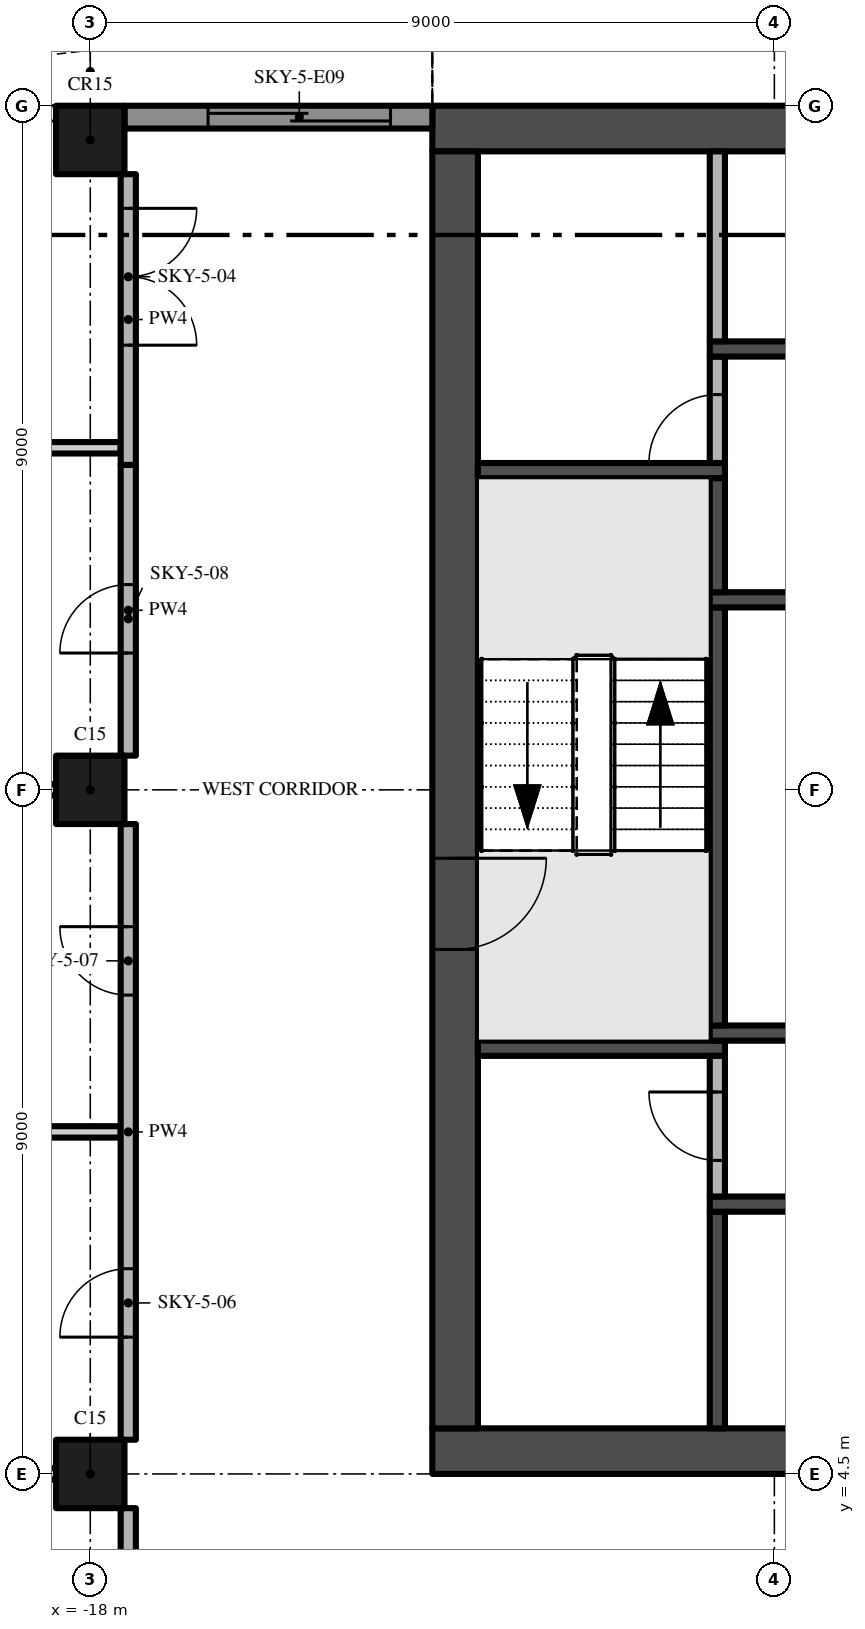
"""IFC4 building model, lengths in metres.
Left out: names, types, materials, properties, quantities, classifications, styles, units other than length and angle.
Written with IfcOpenShell. Run it as: python <this file> out.ifc"""

import sys

from ifc_helpers import new_model, si_unit, direction, frame, frame_2d, origin, origin_2d, place, context, subcontext, project, spatial, polyline, rectangle, outline, extrude, element, fill, save


model = new_model("IFC4")
c1 = context("Model", 3, precision=1e-05, world=origin(), true_north=direction((0.0, 1.0)))
c2 = subcontext(c1, "Body", "Model", "MODEL_VIEW")
j1 = project(units=[si_unit("LENGTHUNIT", "METRE"), si_unit("PLANEANGLEUNIT", "RADIAN")], contexts=[c1])
p1 = place(None, origin())
s1 = spatial("IfcSite", under=j1, at=p1, CompositionType="ELEMENT")
p2 = place(p1, origin())
s2 = spatial("IfcBuilding", under=s1, at=p2, CompositionType="ELEMENT")
p3 = place(p2, frame((0.0, 0.0, 284.4)))
s3 = spatial("IfcBuildingStorey", under=s2, at=p3, CompositionType="ELEMENT", Elevation=284.4)
p4 = place(p3, frame((-13.5, 4.8, -0.3), z_axis=(0.0, 0.0, 1.0), x_axis=(1.0, 0.0, 0.0)))
e1 = element("IfcWall", 1, at=p4, inside=s3, PredefinedType="SHEAR", context=c2, shape_type="SweptSolid", body=[
    extrude(rectangle(XDim=27.0, YDim=0.6, at=frame_2d((13.5, 0.0))), origin(), (0.0, 0.0, 1.0), 5.0),
])
p5 = place(p4, frame((12.0, 0.0, 0.3)))
e2 = element("IfcOpeningElement", 2, at=p5, cuts=e1, PredefinedType="OPENING", context=c2, shape_type="SweptSolid", body=[
    extrude(rectangle(XDim=3.0, YDim=2.4, at=frame_2d((1.5, 1.2))), frame((0.0, 0.31, 0.0), z_axis=(0.0, -1.0, 0.0), x_axis=(1.0, 0.0, 0.0)), (0.0, 0.0, 1.0), 0.62),
])
p6 = place(p4, frame((4.9, 0.0, 0.3)))
e3 = element("IfcOpeningElement", 3, at=p6, cuts=e1, PredefinedType="OPENING", context=c2, shape_type="SweptSolid", body=[
    extrude(rectangle(XDim=1.2, YDim=2.2, at=frame_2d((0.6, 1.1))), frame((0.0, 0.31, 0.0), z_axis=(0.0, -1.0, 0.0), x_axis=(1.0, 0.0, 0.0)), (0.0, 0.0, 1.0), 0.62),
])
p7 = place(p4, frame((20.75, 0.0, 0.3)))
e4 = element("IfcOpeningElement", 4, at=p7, cuts=e1, PredefinedType="OPENING", context=c2, shape_type="SweptSolid", body=[
    extrude(rectangle(XDim=1.5, YDim=2.2, at=frame_2d((0.75, 1.1))), frame((0.0, 0.31, 0.0), z_axis=(0.0, -1.0, 0.0), x_axis=(1.0, 0.0, 0.0)), (0.0, 0.0, 1.0), 0.62),
])
p8 = place(p4, frame((17.4, 0.0, 0.3)))
e5 = element("IfcOpeningElement", 5, at=p8, cuts=e1, PredefinedType="OPENING", context=c2, shape_type="SweptSolid", body=[
    extrude(rectangle(XDim=1.2, YDim=2.2, at=frame_2d((0.6, 1.1))), frame((0.0, 0.31, 0.0), z_axis=(0.0, -1.0, 0.0), x_axis=(1.0, 0.0, 0.0)), (0.0, 0.0, 1.0), 0.62),
])
p9 = place(p3, frame((13.5, 22.2, -0.3), z_axis=(0.0, 0.0, 1.0), x_axis=(-1.0, 0.0, 0.0)))
e6 = element("IfcWall", 6, at=p9, inside=s3, PredefinedType="SHEAR", context=c2, shape_type="SweptSolid", body=[
    extrude(rectangle(XDim=27.0, YDim=0.6, at=frame_2d((13.5, 0.0))), origin(), (0.0, 0.0, 1.0), 5.0),
])
p10 = place(p3, frame((-13.2, 21.9, -0.3), z_axis=(0.0, 0.0, 1.0), x_axis=(0.0, -1.0, 0.0)))
e7 = element("IfcWall", 7, at=p10, inside=s3, PredefinedType="SHEAR", context=c2, shape_type="SweptSolid", body=[
    extrude(rectangle(XDim=16.8, YDim=0.6, at=frame_2d((8.4, 0.0))), origin(), (0.0, 0.0, 1.0), 5.0),
])
p11 = place(p10, frame((9.3, 0.0, 0.3)))
e8 = element("IfcOpeningElement", 8, at=p11, cuts=e7, PredefinedType="OPENING", context=c2, shape_type="SweptSolid", body=[
    extrude(rectangle(XDim=1.2, YDim=2.2, at=frame_2d((0.6, 1.1))), frame((0.0, 0.31, 0.0), z_axis=(0.0, -1.0, 0.0), x_axis=(1.0, 0.0, 0.0)), (0.0, 0.0, 1.0), 0.62),
])
for number, where, z_axis, x_axis in (
    (9, (-18.0, 13.5, 0.0), (0.0, 0.0, 1.0), (1.0, 0.0, 0.0)),
    (10, (-18.0, 22.05, 0.0), (0.0, 0.0, 1.0), (1.0, 0.0, 0.0)),
    (11, (-18.0, 4.5, 0.0), (0.0, 0.0, 1.0), (1.0, 0.0, 0.0)),
):
    element("IfcColumn", number, at=place(p3, frame(where, z_axis=z_axis, x_axis=x_axis)), inside=s3, PredefinedType="COLUMN", context=c2, shape_type="SweptSolid", body=[
        extrude(rectangle(XDim=0.9, YDim=0.9, at=origin_2d()), origin(), (0.0, 0.0, 1.0), 4.7),
    ])
p12 = place(p3, frame((-17.55, 22.35, 0.0), z_axis=(0.0, 0.0, 1.0), x_axis=(1.0, 0.0, 0.0)))
e12 = element("IfcWall", 12, at=p12, inside=s3, PredefinedType="SOLIDWALL", context=c2, shape_type="SweptSolid", body=[
    extrude(rectangle(XDim=4.05, YDim=0.3, at=frame_2d((2.025, 0.0))), origin(), (0.0, 0.0, 1.0), 4.7),
])
p13 = place(p12, frame((1.1, 0.0, 0.0)))
e13 = element("IfcOpeningElement", 13, at=p13, cuts=e12, PredefinedType="OPENING", context=c2, shape_type="SweptSolid", body=[
    extrude(rectangle(XDim=2.4, YDim=2.4, at=frame_2d((1.2, 1.2))), frame((0.0, 0.16, 0.0), z_axis=(0.0, -1.0, 0.0), x_axis=(1.0, 0.0, 0.0)), (0.0, 0.0, 1.0), 0.32),
])
p14 = place(p3, origin())
e14 = element("IfcWall", 14, at=p14, inside=s3, PredefinedType="USERDEFINED", context=c2, shape_type="SweptSolid", body=[
    extrude(outline(polyline([(-13.5, 25.149), (-15.0, 24.488), (-16.5, 23.755), (-18.0, 23.231), (-19.125, 23.1), (-19.5, 23.115), (-21.0, 23.451), (-22.5, 24.112), (-22.601, 23.883), (-21.079, 23.213), (-19.533, 22.866), (-19.115, 22.849), (-17.944, 22.986), (-16.404, 23.524), (-14.895, 24.261), (-13.399, 24.92), (-13.5, 25.149)])), origin(), (0.0, 0.0, 1.0), 0.9),
])
for number, where, z_axis, x_axis in (
    (15, (-12.9, 10.1, 0.0), (0.0, 0.0, 1.0), (1.0, 0.0, 0.0)),
    (16, (-12.9, 17.7, 0.0), (0.0, 0.0, 1.0), (1.0, 0.0, 0.0)),
):
    element("IfcWall", number, at=place(p3, frame(where, z_axis=z_axis, x_axis=x_axis)), inside=s3, PredefinedType="SHEAR", context=c2, shape_type="SweptSolid", body=[
        extrude(rectangle(XDim=3.25, YDim=0.2, at=frame_2d((1.625, 0.0))), origin(), (0.0, 0.0, 1.0), 4.7),
    ])
p15 = place(p3, frame((-9.75, 5.1, 0.0), z_axis=(0.0, 0.0, 1.0), x_axis=(0.0, 1.0, 0.0)))
e17 = element("IfcWall", 17, at=p15, inside=s3, PredefinedType="SHEAR", context=c2, shape_type="SweptSolid", body=[
    extrude(rectangle(XDim=2.85, YDim=0.2, at=frame_2d((1.425, 0.0))), origin(), (0.0, 0.0, 1.0), 4.7),
])
p16 = place(p3, frame((-9.85, 8.05, 0.0), z_axis=(0.0, 0.0, 1.0), x_axis=(1.0, 0.0, 0.0)))
e18 = element("IfcWall", 18, at=p16, inside=s3, PredefinedType="SHEAR", context=c2, shape_type="SweptSolid", body=[
    extrude(rectangle(XDim=8.35, YDim=0.2, at=frame_2d((4.175, 0.0))), origin(), (0.0, 0.0, 1.0), 4.7),
])
p17 = place(p3, frame((-9.75, 8.15, 0.0), z_axis=(0.0, 0.0, 1.0), x_axis=(0.0, 1.0, 0.0)))
e19 = element("IfcWall", 19, at=p17, inside=s3, PredefinedType="PARTITIONING", context=c2, shape_type="SweptSolid", body=[
    extrude(rectangle(XDim=1.85, YDim=0.2, at=frame_2d((0.925, 0.0))), origin(), (0.0, 0.0, 1.0), 4.7),
])
p18 = place(p17, frame((0.475, 0.0, 0.0)))
e20 = element("IfcOpeningElement", 20, at=p18, cuts=e19, PredefinedType="OPENING", context=c2, shape_type="SweptSolid", body=[
    extrude(rectangle(XDim=0.9, YDim=2.1, at=frame_2d((0.45, 1.05))), frame((0.0, 0.11, 0.0), z_axis=(0.0, -1.0, 0.0), x_axis=(1.0, 0.0, 0.0)), (0.0, 0.0, 1.0), 0.22),
])
p19 = place(p3, frame((-9.85, 10.3, 0.0), z_axis=(0.0, 0.0, 1.0), x_axis=(1.0, 0.0, 0.0)))
e21 = element("IfcWall", 21, at=p19, inside=s3, PredefinedType="SHEAR", context=c2, shape_type="SweptSolid", body=[
    extrude(rectangle(XDim=8.35, YDim=0.2, at=frame_2d((4.175, 0.0))), origin(), (0.0, 0.0, 1.0), 4.7),
])
p20 = place(p3, frame((-9.75, 10.4, 0.0), z_axis=(0.0, 0.0, 1.0), x_axis=(0.0, 1.0, 0.0)))
e22 = element("IfcWall", 22, at=p20, inside=s3, PredefinedType="SHEAR", context=c2, shape_type="SweptSolid", body=[
    extrude(rectangle(XDim=5.5, YDim=0.2, at=frame_2d((2.75, 0.0))), origin(), (0.0, 0.0, 1.0), 4.7),
])
p21 = place(p3, frame((-1.5, 16.0, 0.0), z_axis=(0.0, 0.0, 1.0), x_axis=(-1.0, 0.0, 0.0)))
e23 = element("IfcWall", 23, at=p21, inside=s3, PredefinedType="SHEAR", context=c2, shape_type="SweptSolid", body=[
    extrude(rectangle(XDim=8.35, YDim=0.2, at=frame_2d((4.175, 0.0))), origin(), (0.0, 0.0, 1.0), 4.7),
])
p22 = place(p21, frame((6.162, 0.0, 0.0)))
e24 = element("IfcOpeningElement", 24, at=p22, cuts=e23, PredefinedType="OPENING", context=c2, shape_type="SweptSolid", body=[
    extrude(rectangle(XDim=0.9, YDim=2.1, at=frame_2d((0.45, 1.05))), frame((0.0, 0.11, 0.0), z_axis=(0.0, -1.0, 0.0), x_axis=(1.0, 0.0, 0.0)), (0.0, 0.0, 1.0), 0.22),
])
p23 = place(p3, frame((-9.75, 16.1, 0.0), z_axis=(0.0, 0.0, 1.0), x_axis=(0.0, 1.0, 0.0)))
e25 = element("IfcWall", 25, at=p23, inside=s3, PredefinedType="SHEAR", context=c2, shape_type="SweptSolid", body=[
    extrude(rectangle(XDim=1.5, YDim=0.2, at=frame_2d((0.75, 0.0))), origin(), (0.0, 0.0, 1.0), 4.7),
])
p24 = place(p3, frame((-9.75, 17.8, 0.0), z_axis=(0.0, 0.0, 1.0), x_axis=(0.0, 1.0, 0.0)))
e26 = element("IfcWall", 26, at=p24, inside=s3, PredefinedType="PARTITIONING", context=c2, shape_type="SweptSolid", body=[
    extrude(rectangle(XDim=1.4, YDim=0.2, at=frame_2d((0.7, 0.0))), origin(), (0.0, 0.0, 1.0), 4.7),
])
p25 = place(p24, origin())
e27 = element("IfcOpeningElement", 27, at=p25, cuts=e26, PredefinedType="OPENING", context=c2, shape_type="SweptSolid", body=[
    extrude(rectangle(XDim=0.9, YDim=2.1, at=frame_2d((0.45, 1.05))), frame((0.0, 0.11, 0.0), z_axis=(0.0, -1.0, 0.0), x_axis=(1.0, 0.0, 0.0)), (0.0, 0.0, 1.0), 0.22),
])
p26 = place(p3, frame((-9.85, 19.3, 0.0), z_axis=(0.0, 0.0, 1.0), x_axis=(1.0, 0.0, 0.0)))
e28 = element("IfcWall", 28, at=p26, inside=s3, PredefinedType="SHEAR", context=c2, shape_type="SweptSolid", body=[
    extrude(rectangle(XDim=19.7, YDim=0.2, at=frame_2d((9.85, 0.0))), origin(), (0.0, 0.0, 1.0), 4.7),
])
p27 = place(p26, frame((10.519, 0.0, 0.0)))
e29 = element("IfcOpeningElement", 29, at=p27, cuts=e28, PredefinedType="OPENING", context=c2, shape_type="SweptSolid", body=[
    extrude(rectangle(XDim=1.1, YDim=2.1, at=frame_2d((0.55, 1.05))), frame((0.0, 0.11, 0.0), z_axis=(0.0, -1.0, 0.0), x_axis=(1.0, 0.0, 0.0)), (0.0, 0.0, 1.0), 0.22),
])
p28 = place(p26, frame((12.956, 0.0, 0.0)))
e30 = element("IfcOpeningElement", 30, at=p28, cuts=e28, PredefinedType="OPENING", context=c2, shape_type="SweptSolid", body=[
    extrude(rectangle(XDim=1.1, YDim=2.1, at=frame_2d((0.55, 1.05))), frame((0.0, 0.11, 0.0), z_axis=(0.0, -1.0, 0.0), x_axis=(1.0, 0.0, 0.0)), (0.0, 0.0, 1.0), 0.22),
])
p29 = place(p26, frame((15.394, 0.0, 0.0)))
e31 = element("IfcOpeningElement", 31, at=p29, cuts=e28, PredefinedType="OPENING", context=c2, shape_type="SweptSolid", body=[
    extrude(rectangle(XDim=1.1, YDim=2.1, at=frame_2d((0.55, 1.05))), frame((0.0, 0.11, 0.0), z_axis=(0.0, -1.0, 0.0), x_axis=(1.0, 0.0, 0.0)), (0.0, 0.0, 1.0), 0.22),
])
p30 = place(p26, frame((17.831, 0.0, 0.0)))
e32 = element("IfcOpeningElement", 32, at=p30, cuts=e28, PredefinedType="OPENING", context=c2, shape_type="SweptSolid", body=[
    extrude(rectangle(XDim=1.1, YDim=2.1, at=frame_2d((0.55, 1.05))), frame((0.0, 0.11, 0.0), z_axis=(0.0, -1.0, 0.0), x_axis=(1.0, 0.0, 0.0)), (0.0, 0.0, 1.0), 0.22),
])
p31 = place(p26, frame((3.306, 0.0, 0.0)))
e33 = element("IfcOpeningElement", 33, at=p31, cuts=e28, PredefinedType="OPENING", context=c2, shape_type="SweptSolid", body=[
    extrude(rectangle(XDim=0.9, YDim=2.1, at=frame_2d((0.45, 1.05))), frame((0.0, 0.11, 0.0), z_axis=(0.0, -1.0, 0.0), x_axis=(1.0, 0.0, 0.0)), (0.0, 0.0, 1.0), 0.22),
])
p32 = place(p26, frame((8.181, 0.0, 0.0)))
e34 = element("IfcOpeningElement", 34, at=p32, cuts=e28, PredefinedType="OPENING", context=c2, shape_type="SweptSolid", body=[
    extrude(rectangle(XDim=0.9, YDim=2.1, at=frame_2d((0.45, 1.05))), frame((0.0, 0.11, 0.0), z_axis=(0.0, -1.0, 0.0), x_axis=(1.0, 0.0, 0.0)), (0.0, 0.0, 1.0), 0.22),
])
p33 = place(p3, frame((-9.75, 19.4, 0.0), z_axis=(0.0, 0.0, 1.0), x_axis=(0.0, 1.0, 0.0)))
e35 = element("IfcWall", 35, at=p33, inside=s3, PredefinedType="PARTITIONING", context=c2, shape_type="SweptSolid", body=[
    extrude(rectangle(XDim=2.5, YDim=0.2, at=frame_2d((1.25, 0.0))), origin(), (0.0, 0.0, 1.0), 4.7),
])
p34 = place(p3, frame((-22.425, 4.5, 0.0), z_axis=(0.0, 0.0, 1.0), x_axis=(1.0, 0.0, 0.0)))
e36 = element("IfcWall", 36, at=p34, inside=s3, PredefinedType="PARTITIONING", context=c2, shape_type="SweptSolid", body=[
    extrude(rectangle(XDim=3.975, YDim=0.15, at=frame_2d((1.988, 0.0))), origin(), (0.0, 0.0, 1.0), 4.7),
])
p35 = place(p3, frame((-22.425, 9.0, 0.0), z_axis=(0.0, 0.0, 1.0), x_axis=(1.0, 0.0, 0.0)))
e37 = element("IfcWall", 37, at=p35, inside=s3, PredefinedType="PARTITIONING", context=c2, shape_type="SweptSolid", body=[
    extrude(rectangle(XDim=4.825, YDim=0.15, at=frame_2d((2.413, 0.0))), origin(), (0.0, 0.0, 1.0), 4.7),
])
p36 = place(p3, frame((-22.425, 13.5, 0.0), z_axis=(0.0, 0.0, 1.0), x_axis=(1.0, 0.0, 0.0)))
e38 = element("IfcWall", 38, at=p36, inside=s3, PredefinedType="PARTITIONING", context=c2, shape_type="SweptSolid", body=[
    extrude(rectangle(XDim=3.975, YDim=0.15, at=frame_2d((1.988, 0.0))), origin(), (0.0, 0.0, 1.0), 4.7),
])
p37 = place(p3, frame((-22.05, 18.0, 0.0), z_axis=(0.0, 0.0, 1.0), x_axis=(1.0, 0.0, 0.0)))
e39 = element("IfcWall", 39, at=p37, inside=s3, PredefinedType="PARTITIONING", context=c2, shape_type="SweptSolid", body=[
    extrude(rectangle(XDim=4.45, YDim=0.15, at=frame_2d((2.225, 0.0))), origin(), (0.0, 0.0, 1.0), 4.7),
])
p38 = place(p3, frame((-17.5, 4.05, 0.0), z_axis=(0.0, 0.0, 1.0), x_axis=(0.0, -1.0, 0.0)))
e40 = element("IfcWall", 40, at=p38, inside=s3, PredefinedType="PARTITIONING", context=c2, shape_type="SweptSolid", body=[
    extrude(rectangle(XDim=4.225, YDim=0.2, at=frame_2d((2.112, 0.0))), origin(), (0.0, 0.0, 1.0), 4.7),
])
p39 = place(p38, frame((0.9, 0.0, 0.0)))
e41 = element("IfcOpeningElement", 41, at=p39, cuts=e40, PredefinedType="OPENING", context=c2, shape_type="SweptSolid", body=[
    extrude(rectangle(XDim=1.8, YDim=2.4, at=frame_2d((0.9, 1.2))), frame((0.0, 0.11, 0.0), z_axis=(0.0, -1.0, 0.0), x_axis=(1.0, 0.0, 0.0)), (0.0, 0.0, 1.0), 0.22),
])
p40 = place(p3, frame((-17.5, 4.95, 0.0), z_axis=(0.0, 0.0, 1.0), x_axis=(0.0, 1.0, 0.0)))
e42 = element("IfcWall", 42, at=p40, inside=s3, PredefinedType="PARTITIONING", context=c2, shape_type="SweptSolid", body=[
    extrude(rectangle(XDim=8.1, YDim=0.2, at=frame_2d((4.05, 0.0))), origin(), (0.0, 0.0, 1.0), 4.7),
])
p41 = place(p40, frame((1.35, 0.0, 0.0)))
e43 = element("IfcOpeningElement", 43, at=p41, cuts=e42, PredefinedType="OPENING", context=c2, shape_type="SweptSolid", body=[
    extrude(rectangle(XDim=0.9, YDim=2.1, at=frame_2d((0.45, 1.05))), frame((0.0, 0.11, 0.0), z_axis=(0.0, -1.0, 0.0), x_axis=(1.0, 0.0, 0.0)), (0.0, 0.0, 1.0), 0.22),
])
p42 = place(p40, frame((5.85, 0.0, 0.0)))
e44 = element("IfcOpeningElement", 44, at=p42, cuts=e42, PredefinedType="OPENING", context=c2, shape_type="SweptSolid", body=[
    extrude(rectangle(XDim=0.9, YDim=2.1, at=frame_2d((0.45, 1.05))), frame((0.0, 0.11, 0.0), z_axis=(0.0, -1.0, 0.0), x_axis=(1.0, 0.0, 0.0)), (0.0, 0.0, 1.0), 0.22),
])
p43 = place(p3, frame((-17.5, 13.95, 0.0), z_axis=(0.0, 0.0, 1.0), x_axis=(0.0, 1.0, 0.0)))
e45 = element("IfcWall", 45, at=p43, inside=s3, PredefinedType="PARTITIONING", context=c2, shape_type="SweptSolid", body=[
    extrude(rectangle(XDim=3.825, YDim=0.2, at=frame_2d((1.913, 0.0))), origin(), (0.0, 0.0, 1.0), 4.7),
])
p44 = place(p43, frame((1.35, 0.0, 0.0)))
e46 = element("IfcOpeningElement", 46, at=p44, cuts=e45, PredefinedType="OPENING", context=c2, shape_type="SweptSolid", body=[
    extrude(rectangle(XDim=0.9, YDim=2.1, at=frame_2d((0.45, 1.05))), frame((0.0, 0.11, 0.0), z_axis=(0.0, -1.0, 0.0), x_axis=(1.0, 0.0, 0.0)), (0.0, 0.0, 1.0), 0.22),
])
p45 = place(p3, frame((-17.5, 21.6, 0.0), z_axis=(0.0, 0.0, 1.0), x_axis=(0.0, -1.0, 0.0)))
e47 = element("IfcWall", 47, at=p45, inside=s3, PredefinedType="PARTITIONING", context=c2, shape_type="SweptSolid", body=[
    extrude(rectangle(XDim=3.825, YDim=0.2, at=frame_2d((1.913, 0.0))), origin(), (0.0, 0.0, 1.0), 4.7),
])
p46 = place(p45, frame((0.45, 0.0, 0.0)))
e48 = element("IfcOpeningElement", 48, at=p46, cuts=e47, PredefinedType="OPENING", context=c2, shape_type="SweptSolid", body=[
    extrude(rectangle(XDim=1.8, YDim=2.4, at=frame_2d((0.9, 1.2))), frame((0.0, 0.11, 0.0), z_axis=(0.0, -1.0, 0.0), x_axis=(1.0, 0.0, 0.0)), (0.0, 0.0, 1.0), 0.22),
])
p47 = place(p13, origin())
e49 = element("IfcDoor", 49, at=p47, inside=s3, OperationType="SINGLE_SWING_LEFT", PredefinedType="DOOR", context=c2, shape_type="SweptSolid", body=[
    extrude(rectangle(XDim=2.4, YDim=2.4, at=frame_2d((1.2, 1.2))), frame((0.0, 0.025, 0.0), z_axis=(0.0, -1.0, 0.0), x_axis=(1.0, 0.0, 0.0)), (0.0, 0.0, 1.0), 0.05),
])
fill(e13, e49)
p48 = place(p11, frame((1.2, 0.0, 0.0), z_axis=(0.0, 0.0, 1.0), x_axis=(-1.0, 0.0, 0.0)))
e50 = element("IfcDoor", 50, at=p48, inside=s3, OperationType="SINGLE_SWING_RIGHT", PredefinedType="DOOR", context=c2, shape_type="SweptSolid", body=[
    extrude(rectangle(XDim=1.2, YDim=2.2, at=frame_2d((0.6, 1.1))), frame((0.0, 0.025, 0.0), z_axis=(0.0, -1.0, 0.0), x_axis=(1.0, 0.0, 0.0)), (0.0, 0.0, 1.0), 0.05),
])
fill(e8, e50)
p49 = place(p25, origin())
e51 = element("IfcDoor", 51, at=p49, inside=s3, OperationType="SINGLE_SWING_LEFT", PredefinedType="DOOR", context=c2, shape_type="SweptSolid", body=[
    extrude(rectangle(XDim=0.9, YDim=2.1, at=frame_2d((0.45, 1.05))), frame((0.0, 0.025, 0.0), z_axis=(0.0, -1.0, 0.0), x_axis=(1.0, 0.0, 0.0)), (0.0, 0.0, 1.0), 0.05),
])
fill(e27, e51)
p50 = place(p18, origin())
e52 = element("IfcDoor", 52, at=p50, inside=s3, OperationType="SINGLE_SWING_RIGHT", PredefinedType="DOOR", context=c2, shape_type="SweptSolid", body=[
    extrude(rectangle(XDim=0.9, YDim=2.1, at=frame_2d((0.45, 1.05))), frame((0.0, 0.025, 0.0), z_axis=(0.0, -1.0, 0.0), x_axis=(1.0, 0.0, 0.0)), (0.0, 0.0, 1.0), 0.05),
])
fill(e20, e52)
p51 = place(p46, origin())
e53 = element("IfcDoor", 53, at=p51, inside=s3, OperationType="DOUBLE_DOOR_SINGLE_SWING", PredefinedType="DOOR", context=c2, shape_type="SweptSolid", body=[
    extrude(rectangle(XDim=1.8, YDim=2.4, at=frame_2d((0.9, 1.2))), frame((0.0, 0.025, 0.0), z_axis=(0.0, -1.0, 0.0), x_axis=(1.0, 0.0, 0.0)), (0.0, 0.0, 1.0), 0.05),
])
fill(e48, e53)
p52 = place(p41, origin())
e54 = element("IfcDoor", 54, at=p52, inside=s3, OperationType="SINGLE_SWING_LEFT", PredefinedType="DOOR", context=c2, shape_type="SweptSolid", body=[
    extrude(rectangle(XDim=0.9, YDim=2.1, at=frame_2d((0.45, 1.05))), frame((0.0, 0.025, 0.0), z_axis=(0.0, -1.0, 0.0), x_axis=(1.0, 0.0, 0.0)), (0.0, 0.0, 1.0), 0.05),
])
fill(e43, e54)
p53 = place(p42, origin())
e55 = element("IfcDoor", 55, at=p53, inside=s3, OperationType="SINGLE_SWING_RIGHT", PredefinedType="DOOR", context=c2, shape_type="SweptSolid", body=[
    extrude(rectangle(XDim=0.9, YDim=2.1, at=frame_2d((0.45, 1.05))), frame((0.0, 0.025, 0.0), z_axis=(0.0, -1.0, 0.0), x_axis=(1.0, 0.0, 0.0)), (0.0, 0.0, 1.0), 0.05),
])
fill(e44, e55)
p54 = place(p44, origin())
e56 = element("IfcDoor", 56, at=p54, inside=s3, OperationType="SINGLE_SWING_LEFT", PredefinedType="DOOR", context=c2, shape_type="SweptSolid", body=[
    extrude(rectangle(XDim=0.9, YDim=2.1, at=frame_2d((0.45, 1.05))), frame((0.0, 0.025, 0.0), z_axis=(0.0, -1.0, 0.0), x_axis=(1.0, 0.0, 0.0)), (0.0, 0.0, 1.0), 0.05),
])
fill(e46, e56)
save(model, sys.argv[1])
